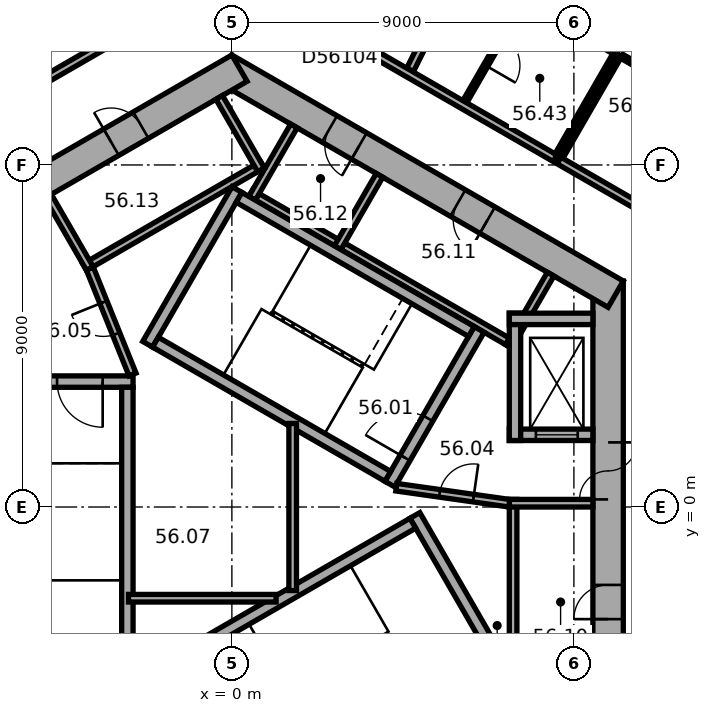
"""IFC4 building model, lengths in metres.
Left out: names, types, materials, properties, quantities, classifications, styles, units other than length and angle.
Written with IfcOpenShell. Run it as: python <this file> out.ifc"""

import sys

from ifc_helpers import new_model, si_unit, direction, frame, frame_2d, origin, place, context, subcontext, project, spatial, rectangle, extrude, element, fill, save


model = new_model("IFC4")
c1 = context("Model", 3, precision=1e-05, world=origin(), true_north=direction((0.0, 1.0)))
c2 = subcontext(c1, "Body", "Model", "MODEL_VIEW")
j1 = project(units=[si_unit("LENGTHUNIT", "METRE"), si_unit("PLANEANGLEUNIT", "RADIAN")], contexts=[c1])
p1 = place(None, origin())
s1 = spatial("IfcSite", under=j1, at=p1, CompositionType="ELEMENT")
p2 = place(p1, origin())
s2 = spatial("IfcBuilding", under=s1, at=p2, CompositionType="ELEMENT")
p3 = place(p2, frame((0.0, 0.0, 229.1)))
s3 = spatial("IfcBuildingStorey", under=s2, at=p3, CompositionType="ELEMENT", Elevation=229.1)
p4 = place(p3, frame((9.9, -5.947, 0.0), z_axis=(0.0, 0.0, 1.0), x_axis=(0.0, 1.0, 0.0)))
e1 = element("IfcWall", 1, at=p4, inside=s3, PredefinedType="SHEAR", context=c2, shape_type="SweptSolid", body=[
    extrude(rectangle(XDim=11.894, YDim=0.8, at=frame_2d((5.947, 0.0))), origin(), (0.0, 0.0, 1.0), 3.7),
])
p5 = place(p4, frame((6.147, 0.0, 0.0)))
e2 = element("IfcOpeningElement", 2, at=p5, cuts=e1, PredefinedType="OPENING", context=c2, shape_type="SweptSolid", body=[
    extrude(rectangle(XDim=1.5, YDim=2.1, at=frame_2d((0.75, 1.05))), frame((0.0, 0.41, 0.0), z_axis=(0.0, -1.0, 0.0), x_axis=(1.0, 0.0, 0.0)), (0.0, 0.0, 1.0), 0.82),
])
p6 = place(p4, frame((2.997, 0.0, 0.0)))
e3 = element("IfcOpeningElement", 3, at=p6, cuts=e1, PredefinedType="OPENING", context=c2, shape_type="SweptSolid", body=[
    extrude(rectangle(XDim=0.9, YDim=2.1, at=frame_2d((0.45, 1.05))), frame((0.0, 0.41, 0.0), z_axis=(0.0, -1.0, 0.0), x_axis=(1.0, 0.0, 0.0)), (0.0, 0.0, 1.0), 0.82),
])
p7 = place(p3, frame((10.1, 5.6, 0.0), z_axis=(0.0, 0.0, 1.0), x_axis=(-0.866023897231, 0.500002609418, 0.0)))
e4 = element("IfcWall", 4, at=p7, inside=s3, PredefinedType="SHEAR", context=c2, shape_type="SweptSolid", body=[
    extrude(rectangle(XDim=11.894, YDim=0.8, at=frame_2d((5.947, 0.0))), origin(), (0.0, 0.0, 1.0), 3.7),
])
p8 = place(p7, frame((3.897, 0.0, 0.0)))
e5 = element("IfcOpeningElement", 5, at=p8, cuts=e4, PredefinedType="OPENING", context=c2, shape_type="SweptSolid", body=[
    extrude(rectangle(XDim=0.9, YDim=2.1, at=frame_2d((0.45, 1.05))), frame((0.0, 0.41, 0.0), z_axis=(0.0, -1.0, 0.0), x_axis=(1.0, 0.0, 0.0)), (0.0, 0.0, 1.0), 0.82),
])
p9 = place(p7, frame((7.797, 0.0, 0.0)))
e6 = element("IfcOpeningElement", 6, at=p9, cuts=e4, PredefinedType="OPENING", context=c2, shape_type="SweptSolid", body=[
    extrude(rectangle(XDim=0.9, YDim=2.1, at=frame_2d((0.45, 1.05))), frame((0.0, 0.41, 0.0), z_axis=(0.0, -1.0, 0.0), x_axis=(1.0, 0.0, 0.0)), (0.0, 0.0, 1.0), 0.82),
])
p10 = place(p3, frame((0.2, 11.547, 0.0), z_axis=(0.0, 0.0, 1.0), x_axis=(-0.866023897231, -0.500002609418, 0.0)))
e7 = element("IfcWall", 7, at=p10, inside=s3, PredefinedType="SHEAR", context=c2, shape_type="SweptSolid", body=[
    extrude(rectangle(XDim=11.894, YDim=0.8, at=frame_2d((5.947, 0.0))), origin(), (0.0, 0.0, 1.0), 3.7),
])
p11 = place(p10, frame((6.147, 0.0, 0.0)))
e8 = element("IfcOpeningElement", 8, at=p11, cuts=e7, PredefinedType="OPENING", context=c2, shape_type="SweptSolid", body=[
    extrude(rectangle(XDim=1.5, YDim=2.1, at=frame_2d((0.75, 1.05))), frame((0.0, 0.41, 0.0), z_axis=(0.0, -1.0, 0.0), x_axis=(1.0, 0.0, 0.0)), (0.0, 0.0, 1.0), 0.82),
])
p12 = place(p10, frame((2.997, 0.0, 0.0)))
e9 = element("IfcOpeningElement", 9, at=p12, cuts=e7, PredefinedType="OPENING", context=c2, shape_type="SweptSolid", body=[
    extrude(rectangle(XDim=0.9, YDim=2.1, at=frame_2d((0.45, 1.05))), frame((0.0, 0.41, 0.0), z_axis=(0.0, -1.0, 0.0), x_axis=(1.0, 0.0, 0.0)), (0.0, 0.0, 1.0), 0.82),
])
p13 = place(p3, frame((7.4, -5.2, 0.0), z_axis=(0.0, 0.0, 1.0), x_axis=(0.0, 1.0, 0.0)))
e10 = element("IfcWall", 10, at=p13, inside=s3, PredefinedType="PARTITIONING", context=c2, shape_type="SweptSolid", body=[
    extrude(rectangle(XDim=5.4, YDim=0.2, at=frame_2d((2.7, 0.0))), origin(), (0.0, 0.0, 1.0), 3.42),
])
p14 = place(p3, frame((7.3, 0.1, 0.0), z_axis=(0.0, 0.0, 1.0), x_axis=(1.0, 0.0, 0.0)))
e11 = element("IfcWall", 11, at=p14, inside=s3, PredefinedType="PARTITIONING", context=c2, shape_type="SweptSolid", body=[
    extrude(rectangle(XDim=2.2, YDim=0.2, at=frame_2d((1.1, 0.0))), origin(), (0.0, 0.0, 1.0), 3.42),
])
p15 = place(p3, frame((7.424, 4.259, 0.0), z_axis=(0.0, 0.0, 1.0), x_axis=(-0.866026010844, 0.49999894854, 0.0)))
e12 = element("IfcWall", 12, at=p15, inside=s3, PredefinedType="PARTITIONING", context=c2, shape_type="SweptSolid", body=[
    extrude(rectangle(XDim=8.0, YDim=0.2, at=frame_2d((4.0, 0.0))), origin(), (0.0, 0.0, 1.0), 3.42),
])
for number, where, z_axis, x_axis in (
    (13, (7.287, 4.222, 0.0), (0.0, 0.0, 1.0), (0.5, 0.866, 0.0)),
    (14, (2.784, 6.822, 0.0), (0.0, 0.0, 1.0), (0.5, 0.866, 0.0)),
    (15, (0.532, 8.122, 0.0), (0.0, 0.0, 1.0), (0.5, 0.866, 0.0)),
):
    element("IfcWall", number, at=place(p3, frame(where, z_axis=z_axis, x_axis=x_axis)), inside=s3, PredefinedType="PARTITIONING", context=c2, shape_type="SweptSolid", body=[
        extrude(rectangle(XDim=2.2, YDim=0.2, at=frame_2d((1.1, 0.0))), origin(), (0.0, 0.0, 1.0), 3.42),
    ])
p16 = place(p3, frame((0.803, 9.009, 0.0), z_axis=(0.0, 0.0, 1.0), x_axis=(-0.866028230842, -0.499995103361, 0.0)))
e16 = element("IfcWall", 16, at=p16, inside=s3, PredefinedType="PARTITIONING", context=c2, shape_type="SweptSolid", body=[
    extrude(rectangle(XDim=5.4, YDim=0.2, at=frame_2d((2.7, 0.0))), origin(), (0.0, 0.0, 1.0), 3.42),
])
p17 = place(p3, frame((0.767, 8.872, 0.0), z_axis=(0.0, 0.0, 1.0), x_axis=(-0.499994660107, 0.866028486751, 0.0)))
e17 = element("IfcWall", 17, at=p17, inside=s3, PredefinedType="PARTITIONING", context=c2, shape_type="SweptSolid", body=[
    extrude(rectangle(XDim=2.2, YDim=0.2, at=frame_2d((1.1, 0.0))), origin(), (0.0, 0.0, 1.0), 3.42),
])
p18 = place(p3, frame((-3.737, 6.272, 0.0), z_axis=(0.0, 0.0, 1.0), x_axis=(-0.50002983664, 0.866008176907, 0.0)))
e18 = element("IfcWall", 18, at=p18, inside=s3, PredefinedType="PARTITIONING", context=c2, shape_type="SweptSolid", body=[
    extrude(rectangle(XDim=2.2, YDim=0.2, at=frame_2d((1.1, 0.0))), origin(), (0.0, 0.0, 1.0), 3.42),
])
p19 = place(p3, frame((4.158, 0.602, 0.0), z_axis=(0.0, 0.0, 1.0), x_axis=(0.499977259774, 0.866038532462, 0.0)))
e19 = element("IfcWall", 19, at=p19, inside=s3, PredefinedType="SHEAR", context=c2, shape_type="SweptSolid", body=[
    extrude(rectangle(XDim=4.7, YDim=0.3, at=frame_2d((2.35, 0.0))), origin(), (0.0, 0.0, 1.0), 3.42),
])
p20 = place(p19, frame((0.8, 0.0, 0.0)))
e20 = element("IfcOpeningElement", 20, at=p20, cuts=e19, PredefinedType="OPENING", context=c2, shape_type="SweptSolid", body=[
    extrude(rectangle(XDim=1.2, YDim=2.1, at=frame_2d((0.6, 1.05))), frame((0.0, 0.16, 0.0), z_axis=(0.0, -1.0, 0.0), x_axis=(1.0, 0.0, 0.0)), (0.0, 0.0, 1.0), 0.32),
])
p21 = place(p3, frame((-2.216, 4.282, 0.0), z_axis=(0.0, 0.0, 1.0), x_axis=(0.499977259774, 0.866038532462, 0.0)))
e21 = element("IfcWall", 21, at=p21, inside=s3, PredefinedType="SHEAR", context=c2, shape_type="SweptSolid", body=[
    extrude(rectangle(XDim=4.7, YDim=0.3, at=frame_2d((2.35, 0.0))), origin(), (0.0, 0.0, 1.0), 3.42),
])
for number, where, z_axis, x_axis in (
    (22, (4.103, 0.807, 0.0), (0.0, 0.0, 1.0), (-0.866, 0.5, 0.0)),
    (23, (6.303, 4.617, 0.0), (0.0, 0.0, 1.0), (-0.866, 0.5, 0.0)),
):
    element("IfcWall", number, at=place(p3, frame(where, z_axis=z_axis, x_axis=x_axis)), inside=s3, PredefinedType="SHEAR", context=c2, shape_type="SweptSolid", body=[
        extrude(rectangle(XDim=7.06, YDim=0.3, at=frame_2d((3.53, 0.0))), origin(), (0.0, 0.0, 1.0), 3.42),
    ])
p22 = place(p3, frame((-2.6, 3.3, 0.0), z_axis=(0.0, 0.0, 1.0), x_axis=(-1.0, 0.0, 0.0)))
e24 = element("IfcWall", 24, at=p22, inside=s3, PredefinedType="SHEAR", context=c2, shape_type="SweptSolid", body=[
    extrude(rectangle(XDim=4.7, YDim=0.3, at=frame_2d((2.35, 0.0))), origin(), (0.0, 0.0, 1.0), 3.42),
])
p23 = place(p22, frame((0.8, 0.0, 0.0)))
e25 = element("IfcOpeningElement", 25, at=p23, cuts=e24, PredefinedType="OPENING", context=c2, shape_type="SweptSolid", body=[
    extrude(rectangle(XDim=1.2, YDim=2.1, at=frame_2d((0.6, 1.05))), frame((0.0, 0.16, 0.0), z_axis=(0.0, -1.0, 0.0), x_axis=(1.0, 0.0, 0.0)), (0.0, 0.0, 1.0), 0.32),
])
p24 = place(p3, frame((-2.75, 3.15, 0.0), z_axis=(0.0, 0.0, 1.0), x_axis=(0.0, -1.0, 0.0)))
e26 = element("IfcWall", 26, at=p24, inside=s3, PredefinedType="SHEAR", context=c2, shape_type="SweptSolid", body=[
    extrude(rectangle(XDim=7.06, YDim=0.3, at=frame_2d((3.53, 0.0))), origin(), (0.0, 0.0, 1.0), 3.42),
])
p25 = place(p3, frame((4.816, -0.222, 0.0), z_axis=(0.0, 0.0, 1.0), x_axis=(0.499977259774, -0.866038532462, 0.0)))
e27 = element("IfcWall", 27, at=p25, inside=s3, PredefinedType="SHEAR", context=c2, shape_type="SweptSolid", body=[
    extrude(rectangle(XDim=4.7, YDim=0.3, at=frame_2d((2.35, 0.0))), origin(), (0.0, 0.0, 1.0), 3.42),
])
p26 = place(p3, frame((-1.353, -3.957, 0.0), z_axis=(0.0, 0.0, 1.0), x_axis=(0.866027801685, 0.499995846692, 0.0)))
e28 = element("IfcWall", 28, at=p26, inside=s3, PredefinedType="SHEAR", context=c2, shape_type="SweptSolid", body=[
    extrude(rectangle(XDim=7.06, YDim=0.3, at=frame_2d((3.53, 0.0))), origin(), (0.0, 0.0, 1.0), 3.42),
])
p27 = place(p3, frame((7.3, 1.9, 0.0), z_axis=(0.0, 0.0, 1.0), x_axis=(1.0, 0.0, 0.0)))
e29 = element("IfcWall", 29, at=p27, inside=s3, PredefinedType="SHEAR", context=c2, shape_type="SweptSolid", body=[
    extrude(rectangle(XDim=2.2, YDim=0.3, at=frame_2d((1.1, 0.0))), origin(), (0.0, 0.0, 1.0), 3.42),
])
p28 = place(p27, frame((0.7, 0.0, 0.0)))
e30 = element("IfcOpeningElement", 30, at=p28, cuts=e29, PredefinedType="OPENING", context=c2, shape_type="SweptSolid", body=[
    extrude(rectangle(XDim=1.1, YDim=2.1, at=frame_2d((0.55, 1.05))), frame((0.0, 0.16, 0.0), z_axis=(0.0, -1.0, 0.0), x_axis=(1.0, 0.0, 0.0)), (0.0, 0.0, 1.0), 0.32),
])
p29 = place(p3, frame((7.45, 1.75, 0.0), z_axis=(0.0, 0.0, 1.0), x_axis=(0.0, 1.0, 0.0)))
e31 = element("IfcWall", 31, at=p29, inside=s3, PredefinedType="SHEAR", context=c2, shape_type="SweptSolid", body=[
    extrude(rectangle(XDim=3.35, YDim=0.3, at=frame_2d((1.675, 0.0))), origin(), (0.0, 0.0, 1.0), 3.42),
])
p30 = place(p3, frame((7.3, 4.95, 0.0), z_axis=(0.0, 0.0, 1.0), x_axis=(1.0, 0.0, 0.0)))
e32 = element("IfcWall", 32, at=p30, inside=s3, PredefinedType="SHEAR", context=c2, shape_type="SweptSolid", body=[
    extrude(rectangle(XDim=2.2, YDim=0.3, at=frame_2d((1.1, 0.0))), origin(), (0.0, 0.0, 1.0), 3.42),
])
p31 = place(p3, frame((4.327, 0.521, 0.0), z_axis=(0.0, 0.0, 1.0), x_axis=(0.990124376366, -0.14019172346, 0.0)))
e33 = element("IfcWall", 33, at=p31, inside=s3, PredefinedType="PARTITIONING", context=c2, shape_type="SweptSolid", body=[
    extrude(rectangle(XDim=3.002, YDim=0.2, at=frame_2d((1.501, 0.0))), origin(), (0.0, 0.0, 1.0), 3.42),
])
p32 = place(p31, frame((1.15, 0.0, 0.0)))
e34 = element("IfcOpeningElement", 34, at=p32, cuts=e33, PredefinedType="OPENING", context=c2, shape_type="SweptSolid", body=[
    extrude(rectangle(XDim=0.9, YDim=2.1, at=frame_2d((0.45, 1.05))), frame((0.0, 0.11, 0.0), z_axis=(0.0, -1.0, 0.0), x_axis=(1.0, 0.0, 0.0)), (0.0, 0.0, 1.0), 0.22),
])
p33 = place(p3, frame((-2.615, 3.487, 0.0), z_axis=(0.0, 0.0, 1.0), x_axis=(-0.373576831041, 0.92759924068, 0.0)))
e35 = element("IfcWall", 35, at=p33, inside=s3, PredefinedType="PARTITIONING", context=c2, shape_type="SweptSolid", body=[
    extrude(rectangle(XDim=3.002, YDim=0.2, at=frame_2d((1.501, 0.0))), origin(), (0.0, 0.0, 1.0), 3.42),
])
p34 = place(p33, frame((1.15, 0.0, 0.0)))
e36 = element("IfcOpeningElement", 36, at=p34, cuts=e35, PredefinedType="OPENING", context=c2, shape_type="SweptSolid", body=[
    extrude(rectangle(XDim=0.9, YDim=2.1, at=frame_2d((0.45, 1.05))), frame((0.0, 0.11, 0.0), z_axis=(0.0, -1.0, 0.0), x_axis=(1.0, 0.0, 0.0)), (0.0, 0.0, 1.0), 0.22),
])
p35 = place(p3, frame((-2.72, -2.4, 0.0), z_axis=(0.0, 0.0, 1.0), x_axis=(1.0, 0.0, 0.0)))
e37 = element("IfcWall", 37, at=p35, inside=s3, PredefinedType="PARTITIONING", context=c2, shape_type="SweptSolid", body=[
    extrude(rectangle(XDim=3.883, YDim=0.2, at=frame_2d((1.941, 0.0))), origin(), (0.0, 0.0, 1.0), 3.42),
])
p36 = place(p3, frame((1.6, -2.198, 0.0), z_axis=(0.0, 0.0, 1.0), x_axis=(0.0, 1.0, 0.0)))
e38 = element("IfcWall", 38, at=p36, inside=s3, PredefinedType="PARTITIONING", context=c2, shape_type="SweptSolid", body=[
    extrude(rectangle(XDim=4.397, YDim=0.2, at=frame_2d((2.198, 0.0))), origin(), (0.0, 0.0, 1.0), 3.42),
])
p37 = place(p3, frame((-1.167, 13.414, 0.0), z_axis=(0.0, 0.0, 1.0), x_axis=(-0.866023347809, -0.500003561037, 0.0)))
e39 = element("IfcWall", 39, at=p37, inside=s3, PredefinedType="PARTITIONING", context=c2, shape_type="SweptSolid", body=[
    extrude(rectangle(XDim=4.661, YDim=0.2, at=frame_2d((2.331, 0.0))), origin(), (0.0, 0.0, 1.0), 3.42),
])
p38 = place(p3, frame((6.13, 10.664, 0.0), z_axis=(0.0, 0.0, 1.0), x_axis=(0.499967891604, 0.866043940782, 0.0)))
e40 = element("IfcWall", 40, at=p38, inside=s3, PredefinedType="PARTITIONING", context=c2, shape_type="SweptSolid", body=[
    extrude(rectangle(XDim=3.1, YDim=0.12, at=frame_2d((1.55, 0.0))), origin(), (0.0, 0.0, 1.0), 3.42),
])
p39 = place(p38, frame((1.1, 0.0, 0.0)))
e41 = element("IfcOpeningElement", 41, at=p39, cuts=e40, PredefinedType="OPENING", context=c2, shape_type="SweptSolid", body=[
    extrude(rectangle(XDim=0.9, YDim=2.1, at=frame_2d((0.45, 1.05))), frame((0.0, 0.07, 0.0), z_axis=(0.0, -1.0, 0.0), x_axis=(1.0, 0.0, 0.0)), (0.0, 0.0, 1.0), 0.14),
])
p40 = place(p3, frame((7.732, 13.318, 0.0), z_axis=(0.0, 0.0, 1.0), x_axis=(0.866057988685, -0.499943557049, 0.0)))
e42 = element("IfcWall", 42, at=p40, inside=s3, PredefinedType="PARTITIONING", context=c2, shape_type="SweptSolid", body=[
    extrude(rectangle(XDim=2.74, YDim=0.12, at=frame_2d((1.37, 0.0))), origin(), (0.0, 0.0, 1.0), 3.42),
])
p41 = place(p3, frame((7.886, 17.913, 0.0), z_axis=(0.0, 0.0, 1.0), x_axis=(-0.446204015428, -0.894931269213, 0.0)))
e43 = element("IfcWall", 43, at=p41, inside=s3, PredefinedType="PARTITIONING", context=c2, shape_type="SweptSolid", body=[
    extrude(rectangle(XDim=7.16, YDim=0.2, at=frame_2d((3.58, 0.0))), origin(), (0.0, 0.0, 1.0), 3.42),
])
p42 = place(p3, frame((8.505, 9.177, 0.0), z_axis=(0.0, 0.0, 1.0), x_axis=(-0.866019839902, 0.500009636803, 0.0)))
e44 = element("IfcWall", 44, at=p42, inside=s3, PredefinedType="PARTITIONING", context=c2, shape_type="SweptSolid", body=[
    extrude(rectangle(XDim=8.683, YDim=0.2, at=frame_2d((4.342, 0.0))), origin(), (0.0, 0.0, 1.0), 3.42),
])
p43 = place(p42, frame((5.73, 0.0, 0.0)))
e45 = element("IfcOpeningElement", 45, at=p43, cuts=e44, PredefinedType="OPENING", context=c2, shape_type="SweptSolid", body=[
    extrude(rectangle(XDim=1.0, YDim=2.1, at=frame_2d((0.5, 1.05))), frame((0.0, 0.11, 0.0), z_axis=(0.0, -1.0, 0.0), x_axis=(1.0, 0.0, 0.0)), (0.0, 0.0, 1.0), 0.22),
])
p44 = place(p3, frame((8.659, 9.204, 0.0), z_axis=(0.0, 0.0, 1.0), x_axis=(0.499933790963, 0.866063626216, 0.0)))
e46 = element("IfcWall", 46, at=p44, inside=s3, PredefinedType="PARTITIONING", context=c2, shape_type="SweptSolid", body=[
    extrude(rectangle(XDim=3.1, YDim=0.12, at=frame_2d((1.55, 0.0))), origin(), (0.0, 0.0, 1.0), 3.42),
])
p45 = place(p3, frame((10.075, 11.896, 0.0), z_axis=(0.0, 0.0, 1.0), x_axis=(-0.499991248344, -0.866030456496, 0.0)))
e47 = element("IfcWall", 47, at=p45, inside=s3, PredefinedType="PARTITIONING", context=c2, shape_type="SweptSolid", body=[
    extrude(rectangle(XDim=3.04, YDim=0.12, at=frame_2d((1.52, 0.0))), origin(), (0.0, 0.0, 1.0), 3.42),
])
p46 = place(p3, frame((10.26, 11.858, 0.0), z_axis=(0.0, 0.0, 1.0), x_axis=(0.866019409031, -0.500010383074, 0.0)))
e48 = element("IfcWall", 48, at=p46, inside=s3, PredefinedType="PARTITIONING", context=c2, shape_type="SweptSolid", body=[
    extrude(rectangle(XDim=2.74, YDim=0.12, at=frame_2d((1.37, 0.0))), origin(), (0.0, 0.0, 1.0), 3.42),
])
p47 = place(p3, frame((11.033, 7.717, 0.0), z_axis=(0.0, 0.0, 1.0), x_axis=(-0.865996816683, 0.500049511043, 0.0)))
e49 = element("IfcWall", 49, at=p47, inside=s3, PredefinedType="PARTITIONING", context=c2, shape_type="SweptSolid", body=[
    extrude(rectangle(XDim=2.8, YDim=0.2, at=frame_2d((1.4, 0.0))), origin(), (0.0, 0.0, 1.0), 3.42),
])
p48 = place(p5, origin())
e50 = element("IfcDoor", 50, at=p48, inside=s3, OperationType="DOUBLE_DOOR_SINGLE_SWING", PredefinedType="DOOR", context=c2, shape_type="SweptSolid", body=[
    extrude(rectangle(XDim=1.5, YDim=2.1, at=frame_2d((0.75, 1.05))), frame((0.0, 0.025, 0.0), z_axis=(0.0, -1.0, 0.0), x_axis=(1.0, 0.0, 0.0)), (0.0, 0.0, 1.0), 0.05),
])
fill(e2, e50)
p49 = place(p20, origin())
e51 = element("IfcDoor", 51, at=p49, inside=s3, OperationType="SINGLE_SWING_RIGHT", PredefinedType="DOOR", context=c2, shape_type="SweptSolid", body=[
    extrude(rectangle(XDim=1.2, YDim=2.1, at=frame_2d((0.6, 1.05))), frame((0.0, 0.025, 0.0), z_axis=(0.0, -1.0, 0.0), x_axis=(1.0, 0.0, 0.0)), (0.0, 0.0, 1.0), 0.05),
])
fill(e20, e51)
p50 = place(p23, origin())
e52 = element("IfcDoor", 52, at=p50, inside=s3, OperationType="SINGLE_SWING_RIGHT", PredefinedType="DOOR", context=c2, shape_type="SweptSolid", body=[
    extrude(rectangle(XDim=1.2, YDim=2.1, at=frame_2d((0.6, 1.05))), frame((0.0, 0.025, 0.0), z_axis=(0.0, -1.0, 0.0), x_axis=(1.0, 0.0, 0.0)), (0.0, 0.0, 1.0), 0.05),
])
fill(e25, e52)
p51 = place(p32, origin())
e53 = element("IfcDoor", 53, at=p51, inside=s3, OperationType="SINGLE_SWING_LEFT", PredefinedType="DOOR", context=c2, shape_type="SweptSolid", body=[
    extrude(rectangle(XDim=0.9, YDim=2.1, at=frame_2d((0.45, 1.05))), frame((0.0, 0.025, 0.0), z_axis=(0.0, -1.0, 0.0), x_axis=(1.0, 0.0, 0.0)), (0.0, 0.0, 1.0), 0.05),
])
fill(e34, e53)
p52 = place(p34, origin())
e54 = element("IfcDoor", 54, at=p52, inside=s3, OperationType="SINGLE_SWING_LEFT", PredefinedType="DOOR", context=c2, shape_type="SweptSolid", body=[
    extrude(rectangle(XDim=0.9, YDim=2.1, at=frame_2d((0.45, 1.05))), frame((0.0, 0.025, 0.0), z_axis=(0.0, -1.0, 0.0), x_axis=(1.0, 0.0, 0.0)), (0.0, 0.0, 1.0), 0.05),
])
fill(e36, e54)
p53 = place(p6, origin())
e55 = element("IfcDoor", 55, at=p53, inside=s3, OperationType="SINGLE_SWING_LEFT", PredefinedType="DOOR", context=c2, shape_type="SweptSolid", body=[
    extrude(rectangle(XDim=0.9, YDim=2.1, at=frame_2d((0.45, 1.05))), frame((0.0, 0.025, 0.0), z_axis=(0.0, -1.0, 0.0), x_axis=(1.0, 0.0, 0.0)), (0.0, 0.0, 1.0), 0.05),
])
fill(e3, e55)
p54 = place(p8, origin())
e56 = element("IfcDoor", 56, at=p54, inside=s3, OperationType="SINGLE_SWING_LEFT", PredefinedType="DOOR", context=c2, shape_type="SweptSolid", body=[
    extrude(rectangle(XDim=0.9, YDim=2.1, at=frame_2d((0.45, 1.05))), frame((0.0, 0.025, 0.0), z_axis=(0.0, -1.0, 0.0), x_axis=(1.0, 0.0, 0.0)), (0.0, 0.0, 1.0), 0.05),
])
fill(e5, e56)
p55 = place(p9, origin())
e57 = element("IfcDoor", 57, at=p55, inside=s3, OperationType="SINGLE_SWING_LEFT", PredefinedType="DOOR", context=c2, shape_type="SweptSolid", body=[
    extrude(rectangle(XDim=0.9, YDim=2.1, at=frame_2d((0.45, 1.05))), frame((0.0, 0.025, 0.0), z_axis=(0.0, -1.0, 0.0), x_axis=(1.0, 0.0, 0.0)), (0.0, 0.0, 1.0), 0.05),
])
fill(e6, e57)
p56 = place(p12, origin())
e58 = element("IfcDoor", 58, at=p56, inside=s3, OperationType="SINGLE_SWING_LEFT", PredefinedType="DOOR", context=c2, shape_type="SweptSolid", body=[
    extrude(rectangle(XDim=0.9, YDim=2.1, at=frame_2d((0.45, 1.05))), frame((0.0, 0.025, 0.0), z_axis=(0.0, -1.0, 0.0), x_axis=(1.0, 0.0, 0.0)), (0.0, 0.0, 1.0), 0.05),
])
fill(e9, e58)
p57 = place(p28, origin())
e59 = element("IfcDoor", 59, at=p57, inside=s3, OperationType="DOUBLE_DOOR_SLIDING", PredefinedType="DOOR", context=c2, shape_type="SweptSolid", body=[
    extrude(rectangle(XDim=1.1, YDim=2.1, at=frame_2d((0.55, 1.05))), frame((0.0, 0.025, 0.0), z_axis=(0.0, -1.0, 0.0), x_axis=(1.0, 0.0, 0.0)), (0.0, 0.0, 1.0), 0.05),
])
fill(e30, e59)
p58 = place(p39, origin())
e60 = element("IfcDoor", 60, at=p58, inside=s3, OperationType="SINGLE_SWING_LEFT", PredefinedType="DOOR", context=c2, shape_type="SweptSolid", body=[
    extrude(rectangle(XDim=0.9, YDim=2.1, at=frame_2d((0.45, 1.05))), frame((0.0, 0.025, 0.0), z_axis=(0.0, -1.0, 0.0), x_axis=(1.0, 0.0, 0.0)), (0.0, 0.0, 1.0), 0.05),
])
fill(e41, e60)
save(model, sys.argv[1])
